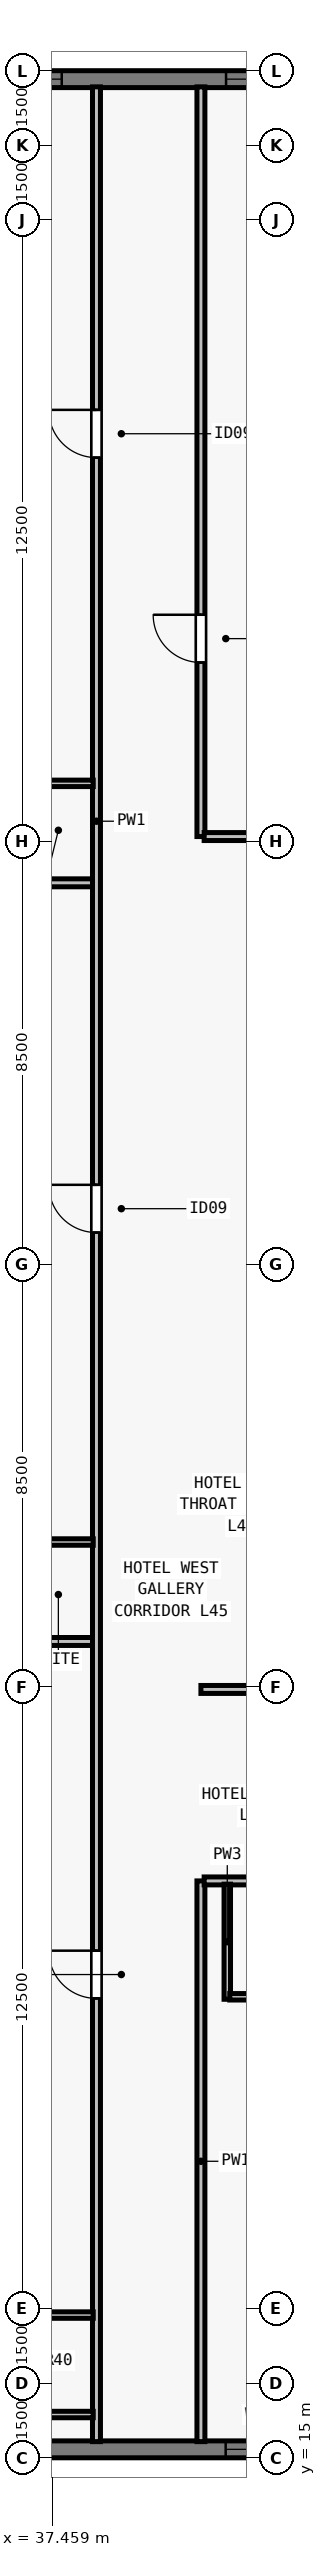
"""IFC4 building model, lengths in metres.
Left out: names, types, materials, properties, quantities, classifications, styles, units other than length and angle.
Written with IfcOpenShell. Run it as: python <this file> out.ifc"""

import sys

from ifc_helpers import new_model, si_unit, direction, frame, frame_2d, origin, place, context, subcontext, project, spatial, rectangle, extrude, element, fill, save


model = new_model("IFC4")
c1 = context("Model", 3, precision=1e-05, world=origin(), true_north=direction((0.0, 1.0)))
c2 = subcontext(c1, "Body", "Model", "MODEL_VIEW")
j1 = project(units=[si_unit("LENGTHUNIT", "METRE"), si_unit("PLANEANGLEUNIT", "RADIAN")], contexts=[c1])
p1 = place(None, origin())
s1 = spatial("IfcSite", under=j1, at=p1, CompositionType="ELEMENT")
p2 = place(p1, origin())
s2 = spatial("IfcBuilding", under=s1, at=p2, CompositionType="ELEMENT")
p3 = place(p2, frame((0.0, 0.0, 165.5)))
s3 = spatial("IfcBuildingStorey", under=s2, at=p3, CompositionType="ELEMENT", Elevation=165.5)
p4 = place(p3, frame((58.2, 15.17, 0.0), z_axis=(0.0, 0.0, 1.0), x_axis=(-1.0, 0.0, 0.0)))
e1 = element("IfcWall", 1, at=p4, inside=s3, PredefinedType="SOLIDWALL", context=c2, shape_type="SweptSolid", body=[
    extrude(rectangle(XDim=25.882, YDim=0.34, at=frame_2d((12.941, 0.0))), origin(), (0.0, 0.0, 1.0), 3.28),
])
p5 = place(p4, frame((4.793, 0.0, 0.8)))
e2 = element("IfcOpeningElement", 2, at=p5, cuts=e1, PredefinedType="OPENING", context=c2, shape_type="SweptSolid", body=[
    extrude(rectangle(XDim=1.75, YDim=1.66, at=frame_2d((0.875, 0.83))), frame((0.0, 0.18, 0.0), z_axis=(0.0, -1.0, 0.0), x_axis=(1.0, 0.0, 0.0)), (0.0, 0.0, 1.0), 0.36),
])
p6 = place(p4, frame((7.38, 0.0, 0.8)))
e3 = element("IfcOpeningElement", 3, at=p6, cuts=e1, PredefinedType="OPENING", context=c2, shape_type="SweptSolid", body=[
    extrude(rectangle(XDim=1.35, YDim=1.66, at=frame_2d((0.675, 0.83))), frame((0.0, 0.18, 0.0), z_axis=(0.0, -1.0, 0.0), x_axis=(1.0, 0.0, 0.0)), (0.0, 0.0, 1.0), 0.36),
])
p7 = place(p4, frame((13.316, 0.0, 0.8)))
e4 = element("IfcOpeningElement", 4, at=p7, cuts=e1, PredefinedType="OPENING", context=c2, shape_type="SweptSolid", body=[
    extrude(rectangle(XDim=1.75, YDim=1.66, at=frame_2d((0.875, 0.83))), frame((0.0, 0.18, 0.0), z_axis=(0.0, -1.0, 0.0), x_axis=(1.0, 0.0, 0.0)), (0.0, 0.0, 1.0), 0.36),
])
p8 = place(p4, frame((15.902, 0.0, 0.8)))
e5 = element("IfcOpeningElement", 5, at=p8, cuts=e1, PredefinedType="OPENING", context=c2, shape_type="SweptSolid", body=[
    extrude(rectangle(XDim=1.35, YDim=1.66, at=frame_2d((0.675, 0.83))), frame((0.0, 0.18, 0.0), z_axis=(0.0, -1.0, 0.0), x_axis=(1.0, 0.0, 0.0)), (0.0, 0.0, 1.0), 0.36),
])
p9 = place(p4, frame((9.51, 0.0, 0.8)))
e6 = element("IfcOpeningElement", 6, at=p9, cuts=e1, PredefinedType="OPENING", context=c2, shape_type="SweptSolid", body=[
    extrude(rectangle(XDim=0.75, YDim=1.66, at=frame_2d((0.375, 0.83))), frame((0.0, 0.18, 0.0), z_axis=(0.0, -1.0, 0.0), x_axis=(1.0, 0.0, 0.0)), (0.0, 0.0, 1.0), 0.36),
])
p10 = place(p4, frame((2.07, 0.0, 0.8)))
e7 = element("IfcOpeningElement", 7, at=p10, cuts=e1, PredefinedType="OPENING", context=c2, shape_type="SweptSolid", body=[
    extrude(rectangle(XDim=0.9, YDim=1.66, at=frame_2d((0.45, 0.83))), frame((0.0, 0.18, 0.0), z_axis=(0.0, -1.0, 0.0), x_axis=(1.0, 0.0, 0.0)), (0.0, 0.0, 1.0), 0.36),
])
p11 = place(p3, frame((32.0, 62.83, 0.0), z_axis=(0.0, 0.0, 1.0), x_axis=(1.0, 0.0, 0.0)))
e8 = element("IfcWall", 8, at=p11, inside=s3, PredefinedType="SOLIDWALL", context=c2, shape_type="SweptSolid", body=[
    extrude(rectangle(XDim=39.682, YDim=0.34, at=frame_2d((19.841, 0.0))), origin(), (0.0, 0.0, 1.0), 3.28),
])
p12 = place(p11, frame((3.902, 0.0, 0.8)))
e9 = element("IfcOpeningElement", 9, at=p12, cuts=e8, PredefinedType="OPENING", context=c2, shape_type="SweptSolid", body=[
    extrude(rectangle(XDim=1.75, YDim=1.66, at=frame_2d((0.875, 0.83))), frame((0.0, 0.18, 0.0), z_axis=(0.0, -1.0, 0.0), x_axis=(1.0, 0.0, 0.0)), (0.0, 0.0, 1.0), 0.36),
])
p13 = place(p11, frame((8.955, 0.0, 0.8)))
e10 = element("IfcOpeningElement", 10, at=p13, cuts=e8, PredefinedType="OPENING", context=c2, shape_type="SweptSolid", body=[
    extrude(rectangle(XDim=1.35, YDim=1.66, at=frame_2d((0.675, 0.83))), frame((0.0, 0.18, 0.0), z_axis=(0.0, -1.0, 0.0), x_axis=(1.0, 0.0, 0.0)), (0.0, 0.0, 1.0), 0.36),
])
p14 = place(p11, frame((11.859, 0.0, 0.8)))
e11 = element("IfcOpeningElement", 11, at=p14, cuts=e8, PredefinedType="OPENING", context=c2, shape_type="SweptSolid", body=[
    extrude(rectangle(XDim=1.75, YDim=1.66, at=frame_2d((0.875, 0.83))), frame((0.0, 0.18, 0.0), z_axis=(0.0, -1.0, 0.0), x_axis=(1.0, 0.0, 0.0)), (0.0, 0.0, 1.0), 0.36),
])
p15 = place(p11, frame((16.062, 0.0, 0.8)))
e12 = element("IfcOpeningElement", 12, at=p15, cuts=e8, PredefinedType="OPENING", context=c2, shape_type="SweptSolid", body=[
    extrude(rectangle(XDim=1.35, YDim=1.66, at=frame_2d((0.675, 0.83))), frame((0.0, 0.18, 0.0), z_axis=(0.0, -1.0, 0.0), x_axis=(1.0, 0.0, 0.0)), (0.0, 0.0, 1.0), 0.36),
])
p16 = place(p11, frame((18.966, 0.0, 0.8)))
e13 = element("IfcOpeningElement", 13, at=p16, cuts=e8, PredefinedType="OPENING", context=c2, shape_type="SweptSolid", body=[
    extrude(rectangle(XDim=1.75, YDim=1.66, at=frame_2d((0.875, 0.83))), frame((0.0, 0.18, 0.0), z_axis=(0.0, -1.0, 0.0), x_axis=(1.0, 0.0, 0.0)), (0.0, 0.0, 1.0), 0.36),
])
p17 = place(p11, frame((22.719, 0.0, 0.8)))
e14 = element("IfcOpeningElement", 14, at=p17, cuts=e8, PredefinedType="OPENING", context=c2, shape_type="SweptSolid", body=[
    extrude(rectangle(XDim=1.35, YDim=1.66, at=frame_2d((0.675, 0.83))), frame((0.0, 0.18, 0.0), z_axis=(0.0, -1.0, 0.0), x_axis=(1.0, 0.0, 0.0)), (0.0, 0.0, 1.0), 0.36),
])
p18 = place(p11, frame((26.073, 0.0, 0.8)))
e15 = element("IfcOpeningElement", 15, at=p18, cuts=e8, PredefinedType="OPENING", context=c2, shape_type="SweptSolid", body=[
    extrude(rectangle(XDim=1.75, YDim=1.66, at=frame_2d((0.875, 0.83))), frame((0.0, 0.18, 0.0), z_axis=(0.0, -1.0, 0.0), x_axis=(1.0, 0.0, 0.0)), (0.0, 0.0, 1.0), 0.36),
])
p19 = place(p11, frame((28.977, 0.0, 0.8)))
e16 = element("IfcOpeningElement", 16, at=p19, cuts=e8, PredefinedType="OPENING", context=c2, shape_type="SweptSolid", body=[
    extrude(rectangle(XDim=1.35, YDim=1.66, at=frame_2d((0.675, 0.83))), frame((0.0, 0.18, 0.0), z_axis=(0.0, -1.0, 0.0), x_axis=(1.0, 0.0, 0.0)), (0.0, 0.0, 1.0), 0.36),
])
p20 = place(p11, frame((33.18, 0.0, 0.8)))
e17 = element("IfcOpeningElement", 17, at=p20, cuts=e8, PredefinedType="OPENING", context=c2, shape_type="SweptSolid", body=[
    extrude(rectangle(XDim=1.75, YDim=1.66, at=frame_2d((0.875, 0.83))), frame((0.0, 0.18, 0.0), z_axis=(0.0, -1.0, 0.0), x_axis=(1.0, 0.0, 0.0)), (0.0, 0.0, 1.0), 0.36),
])
p21 = place(p3, frame((38.35, 15.325, 0.0), z_axis=(0.0, 0.0, 1.0), x_axis=(0.0, 1.0, 0.0)))
e18 = element("IfcWall", 18, at=p21, inside=s3, PredefinedType="PARTITIONING", context=c2, shape_type="SweptSolid", body=[
    extrude(rectangle(XDim=47.35, YDim=0.16, at=frame_2d((23.675, 0.0))), origin(), (0.0, 0.0, 1.0), 2.555),
])
p22 = place(p21, frame((8.912, 0.0, 0.0)))
e19 = element("IfcOpeningElement", 19, at=p22, cuts=e18, PredefinedType="OPENING", context=c2, shape_type="SweptSolid", body=[
    extrude(rectangle(XDim=0.96, YDim=2.15, at=frame_2d((0.48, 1.075))), frame((0.0, 0.09, 0.0), z_axis=(0.0, -1.0, 0.0), x_axis=(1.0, 0.0, 0.0)), (0.0, 0.0, 1.0), 0.18),
])
p23 = place(p21, frame((24.312, 0.0, 0.0)))
e20 = element("IfcOpeningElement", 20, at=p23, cuts=e18, PredefinedType="OPENING", context=c2, shape_type="SweptSolid", body=[
    extrude(rectangle(XDim=0.96, YDim=2.15, at=frame_2d((0.48, 1.075))), frame((0.0, 0.09, 0.0), z_axis=(0.0, -1.0, 0.0), x_axis=(1.0, 0.0, 0.0)), (0.0, 0.0, 1.0), 0.18),
])
p24 = place(p21, frame((39.895, 0.0, 0.0)))
e21 = element("IfcOpeningElement", 21, at=p24, cuts=e18, PredefinedType="OPENING", context=c2, shape_type="SweptSolid", body=[
    extrude(rectangle(XDim=0.96, YDim=2.15, at=frame_2d((0.48, 1.075))), frame((0.0, 0.09, 0.0), z_axis=(0.0, -1.0, 0.0), x_axis=(1.0, 0.0, 0.0)), (0.0, 0.0, 1.0), 0.18),
])
p25 = place(p3, frame((40.45, 15.325, 0.0), z_axis=(0.0, 0.0, 1.0), x_axis=(0.0, 1.0, 0.0)))
e22 = element("IfcWall", 22, at=p25, inside=s3, PredefinedType="PARTITIONING", context=c2, shape_type="SweptSolid", body=[
    extrude(rectangle(XDim=11.275, YDim=0.16, at=frame_2d((5.638, 0.0))), origin(), (0.0, 0.0, 1.0), 2.555),
])
p26 = place(p3, frame((40.45, 47.6, 0.0), z_axis=(0.0, 0.0, 1.0), x_axis=(0.0, 1.0, 0.0)))
e23 = element("IfcWall", 23, at=p26, inside=s3, PredefinedType="PARTITIONING", context=c2, shape_type="SweptSolid", body=[
    extrude(rectangle(XDim=15.075, YDim=0.16, at=frame_2d((7.538, 0.0))), origin(), (0.0, 0.0, 1.0), 2.555),
])
p27 = place(p26, frame((3.5, 0.0, 0.0)))
e24 = element("IfcOpeningElement", 24, at=p27, cuts=e23, PredefinedType="OPENING", context=c2, shape_type="SweptSolid", body=[
    extrude(rectangle(XDim=0.96, YDim=2.12, at=frame_2d((0.48, 1.06))), frame((0.0, 0.09, 0.0), z_axis=(0.0, -1.0, 0.0), x_axis=(1.0, 0.0, 0.0)), (0.0, 0.0, 1.0), 0.18),
])
p28 = place(p3, frame((40.45, 30.45, 0.0), z_axis=(0.0, 0.0, 1.0), x_axis=(1.0, 0.0, 0.0)))
e25 = element("IfcWall", 25, at=p28, inside=s3, PredefinedType="PARTITIONING", context=c2, shape_type="SweptSolid", body=[
    extrude(rectangle(XDim=2.785, YDim=0.16, at=frame_2d((1.393, 0.0))), origin(), (0.0, 0.0, 1.0), 3.28),
])
p29 = place(p3, frame((40.515, 47.6, 0.0), z_axis=(0.0, 0.0, 1.0), x_axis=(1.0, 0.0, 0.0)))
e26 = element("IfcWall", 26, at=p29, inside=s3, PredefinedType="PARTITIONING", context=c2, shape_type="SweptSolid", body=[
    extrude(rectangle(XDim=2.72, YDim=0.16, at=frame_2d((1.36, 0.0))), origin(), (0.0, 0.0, 1.0), 3.28),
])
p30 = place(p3, frame((40.515, 26.6, 0.0), z_axis=(0.0, 0.0, 1.0), x_axis=(1.0, 0.0, 0.0)))
e27 = element("IfcWall", 27, at=p30, inside=s3, PredefinedType="PARTITIONING", context=c2, shape_type="SweptSolid", body=[
    extrude(rectangle(XDim=22.07, YDim=0.16, at=frame_2d((11.035, 0.0))), origin(), (0.0, 0.0, 1.0), 3.28),
])
p31 = place(p30, frame((3.072, 0.0, 0.0)))
e28 = element("IfcOpeningElement", 28, at=p31, cuts=e27, PredefinedType="OPENING", context=c2, shape_type="SweptSolid", body=[
    extrude(rectangle(XDim=0.96, YDim=2.15, at=frame_2d((0.48, 1.075))), frame((0.0, 0.09, 0.0), z_axis=(0.0, -1.0, 0.0), x_axis=(1.0, 0.0, 0.0)), (0.0, 0.0, 1.0), 0.18),
])
p32 = place(p30, frame((5.362, 0.0, 0.0)))
e29 = element("IfcOpeningElement", 29, at=p32, cuts=e27, PredefinedType="OPENING", context=c2, shape_type="SweptSolid", body=[
    extrude(rectangle(XDim=0.96, YDim=2.15, at=frame_2d((0.48, 1.075))), frame((0.0, 0.09, 0.0), z_axis=(0.0, -1.0, 0.0), x_axis=(1.0, 0.0, 0.0)), (0.0, 0.0, 1.0), 0.18),
])
p33 = place(p30, frame((11.566, 0.0, 0.0)))
e30 = element("IfcOpeningElement", 30, at=p33, cuts=e27, PredefinedType="OPENING", context=c2, shape_type="SweptSolid", body=[
    extrude(rectangle(XDim=0.96, YDim=2.15, at=frame_2d((0.48, 1.075))), frame((0.0, 0.09, 0.0), z_axis=(0.0, -1.0, 0.0), x_axis=(1.0, 0.0, 0.0)), (0.0, 0.0, 1.0), 0.18),
])
p34 = place(p30, frame((14.178, 0.0, 0.0)))
e31 = element("IfcOpeningElement", 31, at=p34, cuts=e27, PredefinedType="OPENING", context=c2, shape_type="SweptSolid", body=[
    extrude(rectangle(XDim=0.96, YDim=2.15, at=frame_2d((0.48, 1.075))), frame((0.0, 0.09, 0.0), z_axis=(0.0, -1.0, 0.0), x_axis=(1.0, 0.0, 0.0)), (0.0, 0.0, 1.0), 0.18),
])
p35 = place(p30, frame((20.099, 0.0, 0.0)))
e32 = element("IfcOpeningElement", 32, at=p35, cuts=e27, PredefinedType="OPENING", context=c2, shape_type="SweptSolid", body=[
    extrude(rectangle(XDim=0.96, YDim=2.15, at=frame_2d((0.48, 1.075))), frame((0.0, 0.09, 0.0), z_axis=(0.0, -1.0, 0.0), x_axis=(1.0, 0.0, 0.0)), (0.0, 0.0, 1.0), 0.18),
])
p36 = place(p3, frame((40.98, 24.22, 0.0), z_axis=(0.0, 0.0, 1.0), x_axis=(0.0, 1.0, 0.0)))
e33 = element("IfcWall", 33, at=p36, inside=s3, PredefinedType="PLUMBINGWALL", context=c2, shape_type="SweptSolid", body=[
    extrude(rectangle(XDim=2.315, YDim=0.13, at=frame_2d((1.157, 0.0))), origin(), (0.0, 0.0, 1.0), 3.28),
])
p37 = place(p3, frame((41.03, 24.27, 0.0), z_axis=(0.0, 0.0, 1.0), x_axis=(1.0, 0.0, 0.0)))
e34 = element("IfcWall", 34, at=p37, inside=s3, PredefinedType="PLUMBINGWALL", context=c2, shape_type="SweptSolid", body=[
    extrude(rectangle(XDim=1.542, YDim=0.13, at=frame_2d((0.771, 0.0))), origin(), (0.0, 0.0, 1.0), 3.28),
])
p38 = place(p37, frame((0.361, 0.0, 0.0)))
e35 = element("IfcOpeningElement", 35, at=p38, cuts=e34, PredefinedType="OPENING", context=c2, shape_type="SweptSolid", body=[
    extrude(rectangle(XDim=0.82, YDim=2.1, at=frame_2d((0.41, 1.05))), frame((0.0, 0.075, 0.0), z_axis=(0.0, -1.0, 0.0), x_axis=(1.0, 0.0, 0.0)), (0.0, 0.0, 1.0), 0.15),
])
for number, where, z_axis, x_axis in (
    (36, (35.97, 15.87, 0.0), (0.0, 0.0, 1.0), (1.0, 0.0, 0.0)),
    (37, (35.97, 17.87, 0.0), (0.0, 0.0, 1.0), (1.0, 0.0, 0.0)),
):
    element("IfcWall", number, at=place(p3, frame(where, z_axis=z_axis, x_axis=x_axis)), inside=s3, PredefinedType="PLUMBINGWALL", context=c2, shape_type="SweptSolid", body=[
        extrude(rectangle(XDim=2.315, YDim=0.13, at=frame_2d((1.157, 0.0))), origin(), (0.0, 0.0, 1.0), 3.28),
    ])
p39 = place(p3, frame((28.325, 31.415, 0.0), z_axis=(0.0, 0.0, 1.0), x_axis=(1.0, 0.0, 0.0)))
e38 = element("IfcWall", 38, at=p39, inside=s3, PredefinedType="PARTITIONING", context=c2, shape_type="SweptSolid", body=[
    extrude(rectangle(XDim=9.945, YDim=0.16, at=frame_2d((4.973, 0.0))), origin(), (0.0, 0.0, 1.0), 3.28),
])
p40 = place(p3, frame((35.97, 33.415, 0.0), z_axis=(0.0, 0.0, 1.0), x_axis=(1.0, 0.0, 0.0)))
e39 = element("IfcWall", 39, at=p40, inside=s3, PredefinedType="PLUMBINGWALL", context=c2, shape_type="SweptSolid", body=[
    extrude(rectangle(XDim=2.315, YDim=0.13, at=frame_2d((1.157, 0.0))), origin(), (0.0, 0.0, 1.0), 3.28),
])
p41 = place(p3, frame((28.325, 46.67, 0.0), z_axis=(0.0, 0.0, 1.0), x_axis=(1.0, 0.0, 0.0)))
e40 = element("IfcWall", 40, at=p41, inside=s3, PredefinedType="PARTITIONING", context=c2, shape_type="SweptSolid", body=[
    extrude(rectangle(XDim=9.945, YDim=0.16, at=frame_2d((4.973, 0.0))), origin(), (0.0, 0.0, 1.0), 3.28),
])
p42 = place(p3, frame((35.97, 48.67, 0.0), z_axis=(0.0, 0.0, 1.0), x_axis=(1.0, 0.0, 0.0)))
e41 = element("IfcWall", 41, at=p42, inside=s3, PredefinedType="PLUMBINGWALL", context=c2, shape_type="SweptSolid", body=[
    extrude(rectangle(XDim=2.315, YDim=0.13, at=frame_2d((1.157, 0.0))), origin(), (0.0, 0.0, 1.0), 3.28),
])
p43 = place(p8, origin())
e42 = element("IfcWindow", 42, at=p43, inside=s3, PartitioningType="SINGLE_PANEL", PredefinedType="WINDOW", context=c2, shape_type="SweptSolid", body=[
    extrude(rectangle(XDim=1.35, YDim=1.66, at=frame_2d((0.675, 0.83))), frame((0.0, -0.05, 0.0), z_axis=(0.0, -1.0, 0.0), x_axis=(1.0, 0.0, 0.0)), (0.0, 0.0, 1.0), 0.06),
])
fill(e5, e42)
p44 = place(p12, origin())
e43 = element("IfcWindow", 43, at=p44, inside=s3, PartitioningType="SINGLE_PANEL", PredefinedType="WINDOW", context=c2, shape_type="SweptSolid", body=[
    extrude(rectangle(XDim=1.75, YDim=1.66, at=frame_2d((0.875, 0.83))), frame((0.0, -0.05, 0.0), z_axis=(0.0, -1.0, 0.0), x_axis=(1.0, 0.0, 0.0)), (0.0, 0.0, 1.0), 0.06),
])
fill(e9, e43)
p45 = place(p13, origin())
e44 = element("IfcWindow", 44, at=p45, inside=s3, PartitioningType="SINGLE_PANEL", PredefinedType="WINDOW", context=c2, shape_type="SweptSolid", body=[
    extrude(rectangle(XDim=1.35, YDim=1.66, at=frame_2d((0.675, 0.83))), frame((0.0, -0.05, 0.0), z_axis=(0.0, -1.0, 0.0), x_axis=(1.0, 0.0, 0.0)), (0.0, 0.0, 1.0), 0.06),
])
fill(e10, e44)
p46 = place(p27, origin())
e45 = element("IfcDoor", 45, at=p46, inside=s3, OperationType="SINGLE_SWING_RIGHT", PredefinedType="DOOR", context=c2, shape_type="SweptSolid", body=[
    extrude(rectangle(XDim=0.96, YDim=2.12, at=frame_2d((0.48, 1.06))), frame((0.0, 0.025, 0.0), z_axis=(0.0, -1.0, 0.0), x_axis=(1.0, 0.0, 0.0)), (0.0, 0.0, 1.0), 0.05),
])
fill(e24, e45)
p47 = place(p22, origin())
e46 = element("IfcDoor", 46, at=p47, inside=s3, OperationType="SINGLE_SWING_RIGHT", PredefinedType="DOOR", context=c2, shape_type="SweptSolid", body=[
    extrude(rectangle(XDim=0.96, YDim=2.15, at=frame_2d((0.48, 1.075))), frame((0.0, 0.025, 0.0), z_axis=(0.0, -1.0, 0.0), x_axis=(1.0, 0.0, 0.0)), (0.0, 0.0, 1.0), 0.05),
])
fill(e19, e46)
p48 = place(p23, origin())
e47 = element("IfcDoor", 47, at=p48, inside=s3, OperationType="SINGLE_SWING_RIGHT", PredefinedType="DOOR", context=c2, shape_type="SweptSolid", body=[
    extrude(rectangle(XDim=0.96, YDim=2.15, at=frame_2d((0.48, 1.075))), frame((0.0, 0.025, 0.0), z_axis=(0.0, -1.0, 0.0), x_axis=(1.0, 0.0, 0.0)), (0.0, 0.0, 1.0), 0.05),
])
fill(e20, e47)
p49 = place(p24, origin())
e48 = element("IfcDoor", 48, at=p49, inside=s3, OperationType="SINGLE_SWING_RIGHT", PredefinedType="DOOR", context=c2, shape_type="SweptSolid", body=[
    extrude(rectangle(XDim=0.96, YDim=2.15, at=frame_2d((0.48, 1.075))), frame((0.0, 0.025, 0.0), z_axis=(0.0, -1.0, 0.0), x_axis=(1.0, 0.0, 0.0)), (0.0, 0.0, 1.0), 0.05),
])
fill(e21, e48)
save(model, sys.argv[1])
